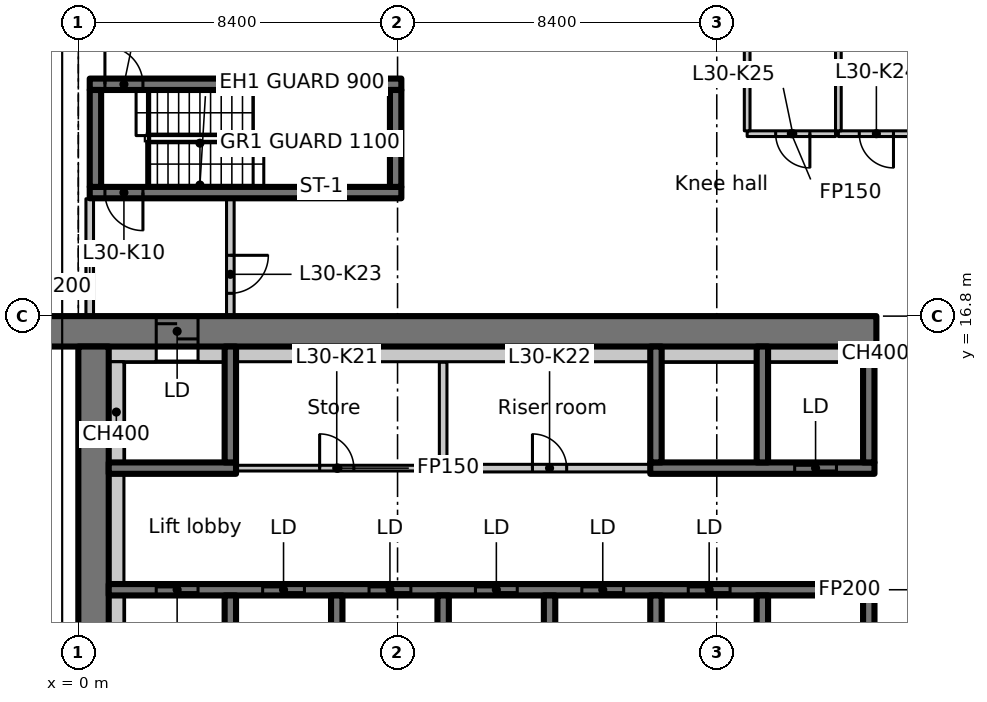
"""IFC4 building model, lengths in metres.
Left out: names, types, materials, properties, quantities, classifications, styles, units other than length and angle.
Written with IfcOpenShell. Run it as: python <this file> out.ifc"""

import sys

from ifc_helpers import new_model, si_unit, direction, frame, frame_2d, origin, place, context, subcontext, project, spatial, rectangle, extrude, element, fill, save


model = new_model("IFC4")
c1 = context("Model", 3, precision=1e-05, world=origin(), true_north=direction((0.0, 1.0)))
c2 = subcontext(c1, "Body", "Model", "MODEL_VIEW")
j1 = project(units=[si_unit("LENGTHUNIT", "METRE"), si_unit("PLANEANGLEUNIT", "RADIAN")], contexts=[c1])
p1 = place(None, origin())
s1 = spatial("IfcSite", under=j1, at=p1, CompositionType="ELEMENT")
p2 = place(p1, origin())
s2 = spatial("IfcBuilding", under=s1, at=p2, CompositionType="ELEMENT")
p3 = place(p2, frame((0.0, 0.0, 124.1)))
s3 = spatial("IfcBuildingStorey", under=s2, at=p3, CompositionType="ELEMENT", Elevation=124.1)
p4 = place(p3, frame((-1.1, 16.4, 0.0), z_axis=(0.0, 0.0, 1.0), x_axis=(1.0, 0.0, 0.0)))
e1 = element("IfcWall", 1, at=p4, inside=s3, PredefinedType="SHEAR", context=c2, shape_type="SweptSolid", body=[
    extrude(rectangle(XDim=22.1, YDim=0.8, at=frame_2d((11.05, 0.0))), origin(), (0.0, 0.0, 1.0), 3.35),
])
p5 = place(p4, frame((3.15, 0.0, 0.0)))
e2 = element("IfcOpeningElement", 2, at=p5, cuts=e1, PredefinedType="OPENING", context=c2, shape_type="SweptSolid", body=[
    extrude(rectangle(XDim=1.1, YDim=2.3, at=frame_2d((0.55, 1.15))), frame((0.0, 0.41, 0.0), z_axis=(0.0, -1.0, 0.0), x_axis=(1.0, 0.0, 0.0)), (0.0, 0.0, 1.0), 0.82),
])
p6 = place(p3, frame((0.4, 7.136, 0.0), z_axis=(0.0, 0.0, 1.0), x_axis=(0.0, 1.0, 0.0)))
e3 = element("IfcWall", 3, at=p6, inside=s3, PredefinedType="SHEAR", context=c2, shape_type="SweptSolid", body=[
    extrude(rectangle(XDim=8.864, YDim=0.8, at=frame_2d((4.432, 0.0))), origin(), (0.0, 0.0, 1.0), 3.35),
])
p7 = place(p3, frame((0.8, 15.8, 0.0), z_axis=(0.0, 0.0, 1.0), x_axis=(1.0, 0.0, 0.0)))
e4 = element("IfcWall", 4, at=p7, inside=s3, PredefinedType="PARTITIONING", context=c2, shape_type="SweptSolid", body=[
    extrude(rectangle(XDim=1.25, YDim=0.4, at=frame_2d((0.625, 0.0))), origin(), (0.0, 0.0, 1.0), 3.35),
])
p8 = place(p3, frame((0.8, 9.6, 0.0), z_axis=(0.0, 0.0, 1.0), x_axis=(1.0, 0.0, 0.0)))
e5 = element("IfcWall", 5, at=p8, inside=s3, PredefinedType="SHEAR", context=c2, shape_type="SweptSolid", body=[
    extrude(rectangle(XDim=20.15, YDim=0.3, at=frame_2d((10.075, 0.0))), origin(), (0.0, 0.0, 1.0), 3.35),
])
p9 = place(p8, frame((1.25, 0.0, 0.0)))
e6 = element("IfcOpeningElement", 6, at=p9, cuts=e5, PredefinedType="OPENING", context=c2, shape_type="SweptSolid", body=[
    extrude(rectangle(XDim=1.1, YDim=2.3, at=frame_2d((0.55, 1.15))), frame((0.0, 0.16, 0.0), z_axis=(0.0, -1.0, 0.0), x_axis=(1.0, 0.0, 0.0)), (0.0, 0.0, 1.0), 0.32),
])
p10 = place(p8, frame((4.05, 0.0, 0.0)))
e7 = element("IfcOpeningElement", 7, at=p10, cuts=e5, PredefinedType="OPENING", context=c2, shape_type="SweptSolid", body=[
    extrude(rectangle(XDim=1.1, YDim=2.3, at=frame_2d((0.55, 1.15))), frame((0.0, 0.16, 0.0), z_axis=(0.0, -1.0, 0.0), x_axis=(1.0, 0.0, 0.0)), (0.0, 0.0, 1.0), 0.32),
])
p11 = place(p8, frame((6.85, 0.0, 0.0)))
e8 = element("IfcOpeningElement", 8, at=p11, cuts=e5, PredefinedType="OPENING", context=c2, shape_type="SweptSolid", body=[
    extrude(rectangle(XDim=1.1, YDim=2.3, at=frame_2d((0.55, 1.15))), frame((0.0, 0.16, 0.0), z_axis=(0.0, -1.0, 0.0), x_axis=(1.0, 0.0, 0.0)), (0.0, 0.0, 1.0), 0.32),
])
p12 = place(p8, frame((9.65, 0.0, 0.0)))
e9 = element("IfcOpeningElement", 9, at=p12, cuts=e5, PredefinedType="OPENING", context=c2, shape_type="SweptSolid", body=[
    extrude(rectangle(XDim=1.1, YDim=2.3, at=frame_2d((0.55, 1.15))), frame((0.0, 0.16, 0.0), z_axis=(0.0, -1.0, 0.0), x_axis=(1.0, 0.0, 0.0)), (0.0, 0.0, 1.0), 0.32),
])
p13 = place(p8, frame((12.45, 0.0, 0.0)))
e10 = element("IfcOpeningElement", 10, at=p13, cuts=e5, PredefinedType="OPENING", context=c2, shape_type="SweptSolid", body=[
    extrude(rectangle(XDim=1.1, YDim=2.3, at=frame_2d((0.55, 1.15))), frame((0.0, 0.16, 0.0), z_axis=(0.0, -1.0, 0.0), x_axis=(1.0, 0.0, 0.0)), (0.0, 0.0, 1.0), 0.32),
])
p14 = place(p8, frame((15.25, 0.0, 0.0)))
e11 = element("IfcOpeningElement", 11, at=p14, cuts=e5, PredefinedType="OPENING", context=c2, shape_type="SweptSolid", body=[
    extrude(rectangle(XDim=1.1, YDim=2.3, at=frame_2d((0.55, 1.15))), frame((0.0, 0.16, 0.0), z_axis=(0.0, -1.0, 0.0), x_axis=(1.0, 0.0, 0.0)), (0.0, 0.0, 1.0), 0.32),
])
for number, where, z_axis, x_axis in (
    (12, (4.0, 7.15, 0.0), (0.0, 0.0, 1.0), (0.0, 1.0, 0.0)),
    (13, (6.8, 7.15, 0.0), (0.0, 0.0, 1.0), (0.0, 1.0, 0.0)),
    (14, (9.6, 7.15, 0.0), (0.0, 0.0, 1.0), (0.0, 1.0, 0.0)),
    (15, (12.4, 7.15, 0.0), (0.0, 0.0, 1.0), (0.0, 1.0, 0.0)),
    (16, (15.2, 7.15, 0.0), (0.0, 0.0, 1.0), (0.0, 1.0, 0.0)),
    (17, (18.0, 7.15, 0.0), (0.0, 0.0, 1.0), (0.0, 1.0, 0.0)),
    (18, (20.8, 7.15, 0.0), (0.0, 0.0, 1.0), (0.0, 1.0, 0.0)),
):
    element("IfcWall", number, at=place(p3, frame(where, z_axis=z_axis, x_axis=x_axis)), inside=s3, PredefinedType="SHEAR", context=c2, shape_type="SweptSolid", body=[
        extrude(rectangle(XDim=2.3, YDim=0.3, at=frame_2d((1.15, 0.0))), origin(), (0.0, 0.0, 1.0), 3.35),
    ])
p15 = place(p3, frame((0.8, 12.8, 0.0), z_axis=(0.0, 0.0, 1.0), x_axis=(1.0, 0.0, 0.0)))
e19 = element("IfcWall", 19, at=p15, inside=s3, PredefinedType="SHEAR", context=c2, shape_type="SweptSolid", body=[
    extrude(rectangle(XDim=3.35, YDim=0.3, at=frame_2d((1.675, 0.0))), origin(), (0.0, 0.0, 1.0), 3.35),
])
p16 = place(p3, frame((4.0, 12.95, 0.0), z_axis=(0.0, 0.0, 1.0), x_axis=(0.0, 1.0, 0.0)))
e20 = element("IfcWall", 20, at=p16, inside=s3, PredefinedType="SHEAR", context=c2, shape_type="SweptSolid", body=[
    extrude(rectangle(XDim=3.05, YDim=0.3, at=frame_2d((1.525, 0.0))), origin(), (0.0, 0.0, 1.0), 3.35),
])
p17 = place(p3, frame((15.05, 12.8, 0.0), z_axis=(0.0, 0.0, 1.0), x_axis=(1.0, 0.0, 0.0)))
e21 = element("IfcWall", 21, at=p17, inside=s3, PredefinedType="SHEAR", context=c2, shape_type="SweptSolid", body=[
    extrude(rectangle(XDim=5.9, YDim=0.3, at=frame_2d((2.95, 0.0))), origin(), (0.0, 0.0, 1.0), 3.35),
])
p18 = place(p17, frame((3.8, 0.0, 0.0)))
e22 = element("IfcOpeningElement", 22, at=p18, cuts=e21, PredefinedType="OPENING", context=c2, shape_type="SweptSolid", body=[
    extrude(rectangle(XDim=1.1, YDim=2.3, at=frame_2d((0.55, 1.15))), frame((0.0, 0.16, 0.0), z_axis=(0.0, -1.0, 0.0), x_axis=(1.0, 0.0, 0.0)), (0.0, 0.0, 1.0), 0.32),
])
for number, where, z_axis, x_axis in (
    (23, (15.2, 12.95, 0.0), (0.0, 0.0, 1.0), (0.0, 1.0, 0.0)),
    (24, (18.0, 12.95, 0.0), (0.0, 0.0, 1.0), (0.0, 1.0, 0.0)),
    (25, (20.8, 12.95, 0.0), (0.0, 0.0, 1.0), (0.0, 1.0, 0.0)),
):
    element("IfcWall", number, at=place(p3, frame(where, z_axis=z_axis, x_axis=x_axis)), inside=s3, PredefinedType="SHEAR", context=c2, shape_type="SweptSolid", body=[
        extrude(rectangle(XDim=3.05, YDim=0.3, at=frame_2d((1.525, 0.0))), origin(), (0.0, 0.0, 1.0), 3.35),
    ])
p19 = place(p3, frame((8.5, 20.05, 0.0), z_axis=(0.0, 0.0, 1.0), x_axis=(-1.0, 0.0, 0.0)))
e26 = element("IfcWall", 26, at=p19, inside=s3, PredefinedType="SHEAR", context=c2, shape_type="SweptSolid", body=[
    extrude(rectangle(XDim=8.2, YDim=0.3, at=frame_2d((4.1, 0.0))), origin(), (0.0, 0.0, 1.0), 3.35),
])
p20 = place(p19, frame((6.8, 0.0, 0.0)))
e27 = element("IfcOpeningElement", 27, at=p20, cuts=e26, PredefinedType="OPENING", context=c2, shape_type="SweptSolid", body=[
    extrude(rectangle(XDim=1.0, YDim=2.1, at=frame_2d((0.5, 1.05))), frame((0.0, 0.16, 0.0), z_axis=(0.0, -1.0, 0.0), x_axis=(1.0, 0.0, 0.0)), (0.0, 0.0, 1.0), 0.32),
])
p21 = place(p3, frame((0.3, 22.9, 0.0), z_axis=(0.0, 0.0, 1.0), x_axis=(1.0, 0.0, 0.0)))
e28 = element("IfcWall", 28, at=p21, inside=s3, PredefinedType="SHEAR", context=c2, shape_type="SweptSolid", body=[
    extrude(rectangle(XDim=8.2, YDim=0.3, at=frame_2d((4.1, 0.0))), origin(), (0.0, 0.0, 1.0), 3.35),
])
p22 = place(p21, frame((0.4, 0.0, 0.0)))
e29 = element("IfcOpeningElement", 29, at=p22, cuts=e28, PredefinedType="OPENING", context=c2, shape_type="SweptSolid", body=[
    extrude(rectangle(XDim=1.0, YDim=2.1, at=frame_2d((0.5, 1.05))), frame((0.0, 0.16, 0.0), z_axis=(0.0, -1.0, 0.0), x_axis=(1.0, 0.0, 0.0)), (0.0, 0.0, 1.0), 0.32),
])
for number, where, z_axis, x_axis in (
    (30, (0.45, 20.2, 0.0), (0.0, 0.0, 1.0), (0.0, 1.0, 0.0)),
    (31, (8.35, 20.2, 0.0), (0.0, 0.0, 1.0), (0.0, 1.0, 0.0)),
):
    element("IfcWall", number, at=place(p3, frame(where, z_axis=z_axis, x_axis=x_axis)), inside=s3, PredefinedType="SHEAR", context=c2, shape_type="SweptSolid", body=[
        extrude(rectangle(XDim=2.55, YDim=0.3, at=frame_2d((1.275, 0.0))), origin(), (0.0, 0.0, 1.0), 3.35),
    ])
p23 = place(p3, frame((0.3, 16.812, 0.0), z_axis=(0.0, 0.0, 1.0), x_axis=(0.0, 1.0, 0.0)))
e32 = element("IfcWall", 32, at=p23, inside=s3, PredefinedType="PARTITIONING", context=c2, shape_type="SweptSolid", body=[
    extrude(rectangle(XDim=3.076, YDim=0.2, at=frame_2d((1.538, 0.0))), origin(), (0.0, 0.0, 1.0), 2.98),
])
p24 = place(p3, frame((4.0, 19.888, 0.0), z_axis=(0.0, 0.0, 1.0), x_axis=(0.0, -1.0, 0.0)))
e33 = element("IfcWall", 33, at=p24, inside=s3, PredefinedType="PARTITIONING", context=c2, shape_type="SweptSolid", body=[
    extrude(rectangle(XDim=3.076, YDim=0.2, at=frame_2d((1.538, 0.0))), origin(), (0.0, 0.0, 1.0), 3.35),
])
p25 = place(p24, frame((1.488, 0.0, 0.0)))
e34 = element("IfcOpeningElement", 34, at=p25, cuts=e33, PredefinedType="OPENING", context=c2, shape_type="SweptSolid", body=[
    extrude(rectangle(XDim=1.0, YDim=2.1, at=frame_2d((0.5, 1.05))), frame((0.0, 0.11, 0.0), z_axis=(0.0, -1.0, 0.0), x_axis=(1.0, 0.0, 0.0)), (0.0, 0.0, 1.0), 0.22),
])
p26 = place(p3, frame((9.6, 15.588, 0.0), z_axis=(0.0, 0.0, 1.0), x_axis=(0.0, -1.0, 0.0)))
e35 = element("IfcWall", 35, at=p26, inside=s3, PredefinedType="PARTITIONING", context=c2, shape_type="SweptSolid", body=[
    extrude(rectangle(XDim=2.788, YDim=0.2, at=frame_2d((1.394, 0.0))), origin(), (0.0, 0.0, 1.0), 3.35),
])
p27 = place(p3, frame((9.7, 12.8, 0.0), z_axis=(0.0, 0.0, 1.0), x_axis=(1.0, 0.0, 0.0)))
e36 = element("IfcWall", 36, at=p27, inside=s3, PredefinedType="PARTITIONING", context=c2, shape_type="SweptSolid", body=[
    extrude(rectangle(XDim=5.338, YDim=0.2, at=frame_2d((2.669, 0.0))), origin(), (0.0, 0.0, 1.0), 3.35),
])
p28 = place(p27, frame((2.25, 0.0, 0.0)))
e37 = element("IfcOpeningElement", 37, at=p28, cuts=e36, PredefinedType="OPENING", context=c2, shape_type="SweptSolid", body=[
    extrude(rectangle(XDim=0.9, YDim=2.1, at=frame_2d((0.45, 1.05))), frame((0.0, 0.11, 0.0), z_axis=(0.0, -1.0, 0.0), x_axis=(1.0, 0.0, 0.0)), (0.0, 0.0, 1.0), 0.22),
])
p29 = place(p3, frame((4.162, 12.8, 0.0), z_axis=(0.0, 0.0, 1.0), x_axis=(1.0, 0.0, 0.0)))
e38 = element("IfcWall", 38, at=p29, inside=s3, PredefinedType="PARTITIONING", context=c2, shape_type="SweptSolid", body=[
    extrude(rectangle(XDim=5.338, YDim=0.15, at=frame_2d((2.669, 0.0))), origin(), (0.0, 0.0, 1.0), 3.35),
])
p30 = place(p29, frame((2.188, 0.0, 0.0)))
e39 = element("IfcOpeningElement", 39, at=p30, cuts=e38, PredefinedType="OPENING", context=c2, shape_type="SweptSolid", body=[
    extrude(rectangle(XDim=0.9, YDim=2.1, at=frame_2d((0.45, 1.05))), frame((0.0, 0.085, 0.0), z_axis=(0.0, -1.0, 0.0), x_axis=(1.0, 0.0, 0.0)), (0.0, 0.0, 1.0), 0.17),
])
p31 = place(p3, frame((21.925, 21.6, 0.0), z_axis=(0.0, 0.0, 1.0), x_axis=(-1.0, 0.0, 0.0)))
e40 = element("IfcWall", 40, at=p31, inside=s3, PredefinedType="PARTITIONING", context=c2, shape_type="SweptSolid", body=[
    extrude(rectangle(XDim=1.925, YDim=0.15, at=frame_2d((0.962, 0.0))), origin(), (0.0, 0.0, 1.0), 3.35),
])
p32 = place(p31, frame((0.475, 0.0, 0.0)))
e41 = element("IfcOpeningElement", 41, at=p32, cuts=e40, PredefinedType="OPENING", context=c2, shape_type="SweptSolid", body=[
    extrude(rectangle(XDim=0.9, YDim=2.1, at=frame_2d((0.45, 1.05))), frame((0.0, 0.085, 0.0), z_axis=(0.0, -1.0, 0.0), x_axis=(1.0, 0.0, 0.0)), (0.0, 0.0, 1.0), 0.17),
])
p33 = place(p3, frame((20.0, 21.675, 0.0), z_axis=(0.0, 0.0, 1.0), x_axis=(0.0, 1.0, 0.0)))
e42 = element("IfcWall", 42, at=p33, inside=s3, PredefinedType="PARTITIONING", context=c2, shape_type="SweptSolid", body=[
    extrude(rectangle(XDim=2.25, YDim=0.15, at=frame_2d((1.125, 0.0))), origin(), (0.0, 0.0, 1.0), 3.35),
])
p34 = place(p3, frame((19.925, 21.6, 0.0), z_axis=(0.0, 0.0, 1.0), x_axis=(-1.0, 0.0, 0.0)))
e43 = element("IfcWall", 43, at=p34, inside=s3, PredefinedType="PARTITIONING", context=c2, shape_type="SweptSolid", body=[
    extrude(rectangle(XDim=2.325, YDim=0.15, at=frame_2d((1.163, 0.0))), origin(), (0.0, 0.0, 1.0), 3.35),
])
p35 = place(p34, frame((0.675, 0.0, 0.0)))
e44 = element("IfcOpeningElement", 44, at=p35, cuts=e43, PredefinedType="OPENING", context=c2, shape_type="SweptSolid", body=[
    extrude(rectangle(XDim=0.9, YDim=2.1, at=frame_2d((0.45, 1.05))), frame((0.0, 0.085, 0.0), z_axis=(0.0, -1.0, 0.0), x_axis=(1.0, 0.0, 0.0)), (0.0, 0.0, 1.0), 0.17),
])
p36 = place(p3, frame((17.6, 21.675, 0.0), z_axis=(0.0, 0.0, 1.0), x_axis=(0.0, 1.0, 0.0)))
e45 = element("IfcWall", 45, at=p36, inside=s3, PredefinedType="PARTITIONING", context=c2, shape_type="SweptSolid", body=[
    extrude(rectangle(XDim=2.325, YDim=0.15, at=frame_2d((1.163, 0.0))), origin(), (0.0, 0.0, 1.0), 3.35),
])
p37 = place(p3, frame((1.0, 7.15, 0.0), z_axis=(0.0, 0.0, 1.0), x_axis=(0.0, 1.0, 0.0)))
e46 = element("IfcWall", 46, at=p37, inside=s3, PredefinedType="PARTITIONING", context=c2, shape_type="SweptSolid", body=[
    extrude(rectangle(XDim=2.3, YDim=0.4, at=frame_2d((1.15, 0.0))), origin(), (0.0, 0.0, 1.0), 3.35),
])
p38 = place(p3, frame((1.0, 9.75, 0.0), z_axis=(0.0, 0.0, 1.0), x_axis=(0.0, 1.0, 0.0)))
e47 = element("IfcWall", 47, at=p38, inside=s3, PredefinedType="PARTITIONING", context=c2, shape_type="SweptSolid", body=[
    extrude(rectangle(XDim=2.9, YDim=0.4, at=frame_2d((1.45, 0.0))), origin(), (0.0, 0.0, 1.0), 3.35),
])
p39 = place(p3, frame((1.0, 12.95, 0.0), z_axis=(0.0, 0.0, 1.0), x_axis=(0.0, 1.0, 0.0)))
e48 = element("IfcWall", 48, at=p39, inside=s3, PredefinedType="PARTITIONING", context=c2, shape_type="SweptSolid", body=[
    extrude(rectangle(XDim=2.65, YDim=0.4, at=frame_2d((1.325, 0.0))), origin(), (0.0, 0.0, 1.0), 3.35),
])
p40 = place(p3, frame((3.15, 15.8, 0.0), z_axis=(0.0, 0.0, 1.0), x_axis=(1.0, 0.0, 0.0)))
e49 = element("IfcWall", 49, at=p40, inside=s3, PredefinedType="PARTITIONING", context=c2, shape_type="SweptSolid", body=[
    extrude(rectangle(XDim=0.7, YDim=0.4, at=frame_2d((0.35, 0.0))), origin(), (0.0, 0.0, 1.0), 3.35),
])
p41 = place(p3, frame((4.15, 15.8, 0.0), z_axis=(0.0, 0.0, 1.0), x_axis=(1.0, 0.0, 0.0)))
e50 = element("IfcWall", 50, at=p41, inside=s3, PredefinedType="PARTITIONING", context=c2, shape_type="SweptSolid", body=[
    extrude(rectangle(XDim=10.9, YDim=0.4, at=frame_2d((5.45, 0.0))), origin(), (0.0, 0.0, 1.0), 3.35),
])
for number, where, z_axis, x_axis in (
    (51, (15.35, 15.8, 0.0), (0.0, 0.0, 1.0), (1.0, 0.0, 0.0)),
    (52, (18.15, 15.8, 0.0), (0.0, 0.0, 1.0), (1.0, 0.0, 0.0)),
):
    element("IfcWall", number, at=place(p3, frame(where, z_axis=z_axis, x_axis=x_axis)), inside=s3, PredefinedType="PARTITIONING", context=c2, shape_type="SweptSolid", body=[
        extrude(rectangle(XDim=2.5, YDim=0.4, at=frame_2d((1.25, 0.0))), origin(), (0.0, 0.0, 1.0), 3.35),
    ])
p42 = place(p3, frame((20.95, 15.8, 0.0), z_axis=(0.0, 0.0, 1.0), x_axis=(1.0, 0.0, 0.0)))
e53 = element("IfcWall", 53, at=p42, inside=s3, PredefinedType="PARTITIONING", context=c2, shape_type="SweptSolid", body=[
    extrude(rectangle(XDim=0.05, YDim=0.4, at=frame_2d((0.025, 0.0))), origin(), (0.0, 0.0, 1.0), 3.35),
])
p43 = place(p9, origin())
e54 = element("IfcDoor", 54, at=p43, inside=s3, OperationType="SLIDING_TO_LEFT", PredefinedType="DOOR", context=c2, shape_type="SweptSolid", body=[
    extrude(rectangle(XDim=1.1, YDim=2.3, at=frame_2d((0.55, 1.15))), frame((0.0, 0.025, 0.0), z_axis=(0.0, -1.0, 0.0), x_axis=(1.0, 0.0, 0.0)), (0.0, 0.0, 1.0), 0.05),
])
fill(e6, e54)
p44 = place(p10, origin())
e55 = element("IfcDoor", 55, at=p44, inside=s3, OperationType="SLIDING_TO_LEFT", PredefinedType="DOOR", context=c2, shape_type="SweptSolid", body=[
    extrude(rectangle(XDim=1.1, YDim=2.3, at=frame_2d((0.55, 1.15))), frame((0.0, 0.025, 0.0), z_axis=(0.0, -1.0, 0.0), x_axis=(1.0, 0.0, 0.0)), (0.0, 0.0, 1.0), 0.05),
])
fill(e7, e55)
p45 = place(p11, origin())
e56 = element("IfcDoor", 56, at=p45, inside=s3, OperationType="SLIDING_TO_LEFT", PredefinedType="DOOR", context=c2, shape_type="SweptSolid", body=[
    extrude(rectangle(XDim=1.1, YDim=2.3, at=frame_2d((0.55, 1.15))), frame((0.0, 0.025, 0.0), z_axis=(0.0, -1.0, 0.0), x_axis=(1.0, 0.0, 0.0)), (0.0, 0.0, 1.0), 0.05),
])
fill(e8, e56)
p46 = place(p12, origin())
e57 = element("IfcDoor", 57, at=p46, inside=s3, OperationType="SLIDING_TO_LEFT", PredefinedType="DOOR", context=c2, shape_type="SweptSolid", body=[
    extrude(rectangle(XDim=1.1, YDim=2.3, at=frame_2d((0.55, 1.15))), frame((0.0, 0.025, 0.0), z_axis=(0.0, -1.0, 0.0), x_axis=(1.0, 0.0, 0.0)), (0.0, 0.0, 1.0), 0.05),
])
fill(e9, e57)
p47 = place(p13, origin())
e58 = element("IfcDoor", 58, at=p47, inside=s3, OperationType="SLIDING_TO_LEFT", PredefinedType="DOOR", context=c2, shape_type="SweptSolid", body=[
    extrude(rectangle(XDim=1.1, YDim=2.3, at=frame_2d((0.55, 1.15))), frame((0.0, 0.025, 0.0), z_axis=(0.0, -1.0, 0.0), x_axis=(1.0, 0.0, 0.0)), (0.0, 0.0, 1.0), 0.05),
])
fill(e10, e58)
p48 = place(p14, origin())
e59 = element("IfcDoor", 59, at=p48, inside=s3, OperationType="SLIDING_TO_LEFT", PredefinedType="DOOR", context=c2, shape_type="SweptSolid", body=[
    extrude(rectangle(XDim=1.1, YDim=2.3, at=frame_2d((0.55, 1.15))), frame((0.0, 0.025, 0.0), z_axis=(0.0, -1.0, 0.0), x_axis=(1.0, 0.0, 0.0)), (0.0, 0.0, 1.0), 0.05),
])
fill(e11, e59)
p49 = place(p5, origin())
e60 = element("IfcDoor", 60, at=p49, inside=s3, OperationType="SLIDING_TO_LEFT", PredefinedType="DOOR", context=c2, shape_type="SweptSolid", body=[
    extrude(rectangle(XDim=1.1, YDim=2.3, at=frame_2d((0.55, 1.15))), frame((0.0, 0.025, 0.0), z_axis=(0.0, -1.0, 0.0), x_axis=(1.0, 0.0, 0.0)), (0.0, 0.0, 1.0), 0.05),
])
fill(e2, e60)
p50 = place(p18, origin())
e61 = element("IfcDoor", 61, at=p50, inside=s3, OperationType="SLIDING_TO_LEFT", PredefinedType="DOOR", context=c2, shape_type="SweptSolid", body=[
    extrude(rectangle(XDim=1.1, YDim=2.3, at=frame_2d((0.55, 1.15))), frame((0.0, 0.025, 0.0), z_axis=(0.0, -1.0, 0.0), x_axis=(1.0, 0.0, 0.0)), (0.0, 0.0, 1.0), 0.05),
])
fill(e22, e61)
p51 = place(p20, origin())
e62 = element("IfcDoor", 62, at=p51, inside=s3, OperationType="SINGLE_SWING_LEFT", PredefinedType="DOOR", context=c2, shape_type="SweptSolid", body=[
    extrude(rectangle(XDim=1.0, YDim=2.1, at=frame_2d((0.5, 1.05))), frame((0.0, 0.025, 0.0), z_axis=(0.0, -1.0, 0.0), x_axis=(1.0, 0.0, 0.0)), (0.0, 0.0, 1.0), 0.05),
])
fill(e27, e62)
p52 = place(p22, origin())
e63 = element("IfcDoor", 63, at=p52, inside=s3, OperationType="SINGLE_SWING_RIGHT", PredefinedType="DOOR", context=c2, shape_type="SweptSolid", body=[
    extrude(rectangle(XDim=1.0, YDim=2.1, at=frame_2d((0.5, 1.05))), frame((0.0, 0.025, 0.0), z_axis=(0.0, -1.0, 0.0), x_axis=(1.0, 0.0, 0.0)), (0.0, 0.0, 1.0), 0.05),
])
fill(e29, e63)
p53 = place(p30, origin())
e64 = element("IfcDoor", 64, at=p53, inside=s3, OperationType="SINGLE_SWING_RIGHT", PredefinedType="DOOR", context=c2, shape_type="SweptSolid", body=[
    extrude(rectangle(XDim=0.9, YDim=2.1, at=frame_2d((0.45, 1.05))), frame((0.0, 0.025, 0.0), z_axis=(0.0, -1.0, 0.0), x_axis=(1.0, 0.0, 0.0)), (0.0, 0.0, 1.0), 0.05),
])
fill(e39, e64)
p54 = place(p28, origin())
e65 = element("IfcDoor", 65, at=p54, inside=s3, OperationType="SINGLE_SWING_LEFT", PredefinedType="DOOR", context=c2, shape_type="SweptSolid", body=[
    extrude(rectangle(XDim=0.9, YDim=2.1, at=frame_2d((0.45, 1.05))), frame((0.0, 0.025, 0.0), z_axis=(0.0, -1.0, 0.0), x_axis=(1.0, 0.0, 0.0)), (0.0, 0.0, 1.0), 0.05),
])
fill(e37, e65)
p55 = place(p25, origin())
e66 = element("IfcDoor", 66, at=p55, inside=s3, OperationType="SINGLE_SWING_RIGHT", PredefinedType="DOOR", context=c2, shape_type="SweptSolid", body=[
    extrude(rectangle(XDim=1.0, YDim=2.1, at=frame_2d((0.5, 1.05))), frame((0.0, 0.025, 0.0), z_axis=(0.0, -1.0, 0.0), x_axis=(1.0, 0.0, 0.0)), (0.0, 0.0, 1.0), 0.05),
])
fill(e34, e66)
p56 = place(p32, origin())
e67 = element("IfcDoor", 67, at=p56, inside=s3, OperationType="SINGLE_SWING_LEFT", PredefinedType="DOOR", context=c2, shape_type="SweptSolid", body=[
    extrude(rectangle(XDim=0.9, YDim=2.1, at=frame_2d((0.45, 1.05))), frame((0.0, 0.025, 0.0), z_axis=(0.0, -1.0, 0.0), x_axis=(1.0, 0.0, 0.0)), (0.0, 0.0, 1.0), 0.05),
])
fill(e41, e67)
p57 = place(p35, origin())
e68 = element("IfcDoor", 68, at=p57, inside=s3, OperationType="SINGLE_SWING_RIGHT", PredefinedType="DOOR", context=c2, shape_type="SweptSolid", body=[
    extrude(rectangle(XDim=0.9, YDim=2.1, at=frame_2d((0.45, 1.05))), frame((0.0, 0.025, 0.0), z_axis=(0.0, -1.0, 0.0), x_axis=(1.0, 0.0, 0.0)), (0.0, 0.0, 1.0), 0.05),
])
fill(e44, e68)
save(model, sys.argv[1])
